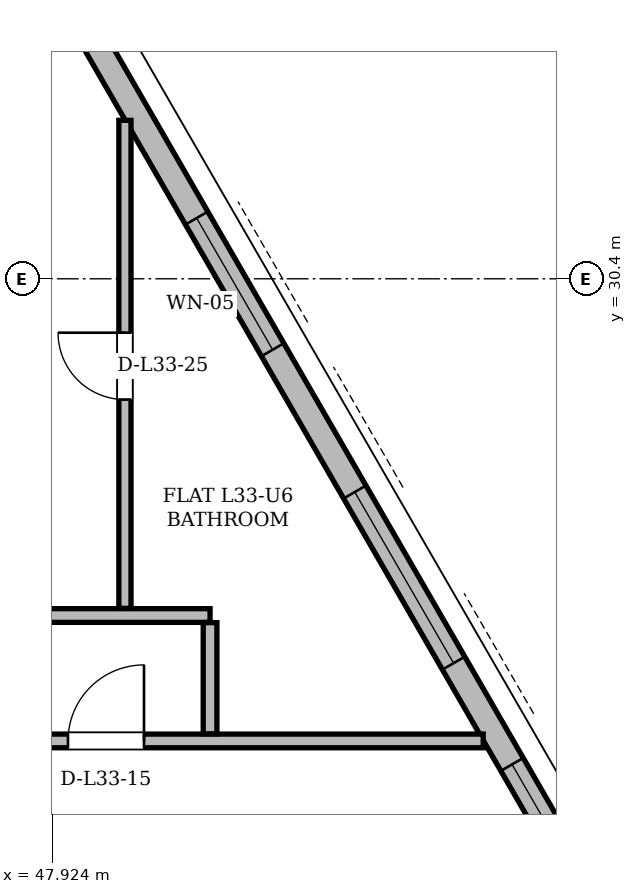
"""IFC4 building model, lengths in metres.
Left out: names, types, materials, properties, quantities, classifications, styles, units other than length and angle.
Written with IfcOpenShell. Run it as: python <this file> out.ifc"""

import sys

from ifc_helpers import new_model, si_unit, direction, frame, frame_2d, origin, place, context, subcontext, project, spatial, rectangle, extrude, element, fill, save


model = new_model("IFC4")
c1 = context("Model", 3, precision=1e-05, world=origin(), true_north=direction((0.0, 1.0)))
c2 = subcontext(c1, "Body", "Model", "MODEL_VIEW")
j1 = project(units=[si_unit("LENGTHUNIT", "METRE"), si_unit("PLANEANGLEUNIT", "RADIAN")], contexts=[c1])
p1 = place(None, origin())
s1 = spatial("IfcSite", under=j1, at=p1, CompositionType="ELEMENT")
p2 = place(p1, origin())
s2 = spatial("IfcBuilding", under=s1, at=p2, CompositionType="ELEMENT")
p3 = place(p2, frame((0.0, 0.0, 126.6)))
s3 = spatial("IfcBuildingStorey", under=s2, at=p3, CompositionType="ELEMENT", Elevation=126.6)
p4 = place(p3, frame((60.311, 13.034, 0.0), z_axis=(0.0, 0.0, 1.0), x_axis=(-0.499998814518, 0.866026088222, 0.0)))
e1 = element("IfcWall", 1, at=p4, inside=s3, PredefinedType="SOLIDWALL", context=c2, shape_type="SweptSolid", body=[
    extrude(rectangle(XDim=35.049, YDim=0.34, at=frame_2d((17.524, 0.0))), origin(), (0.0, 0.0, 1.0), 2.578),
])
p5 = place(p4, frame((8.034, 0.0, 0.0)))
e2 = element("IfcOpeningElement", 2, at=p5, cuts=e1, PredefinedType="OPENING", context=c2, shape_type="SweptSolid", body=[
    extrude(rectangle(XDim=1.5, YDim=2.2, at=frame_2d((0.75, 1.1))), frame((0.0, 0.17, 0.0), z_axis=(0.0, -1.0, 0.0), x_axis=(1.0, 0.0, 0.0)), (0.0, 0.0, 1.0), 0.34),
])
p6 = place(p4, frame((26.969, 0.0, 0.0)))
e3 = element("IfcOpeningElement", 3, at=p6, cuts=e1, PredefinedType="OPENING", context=c2, shape_type="SweptSolid", body=[
    extrude(rectangle(XDim=1.5, YDim=2.2, at=frame_2d((0.75, 1.1))), frame((0.0, 0.17, 0.0), z_axis=(0.0, -1.0, 0.0), x_axis=(1.0, 0.0, 0.0)), (0.0, 0.0, 1.0), 0.34),
])
p7 = place(p4, frame((3.306, 0.0, 0.85)))
e4 = element("IfcOpeningElement", 4, at=p7, cuts=e1, PredefinedType="OPENING", context=c2, shape_type="SweptSolid", body=[
    extrude(rectangle(XDim=1.2, YDim=1.48, at=frame_2d((0.6, 0.74))), frame((0.0, 0.17, 0.0), z_axis=(0.0, -1.0, 0.0), x_axis=(1.0, 0.0, 0.0)), (0.0, 0.0, 1.0), 0.34),
])
p8 = place(p4, frame((11.475, 0.0, 0.85)))
e5 = element("IfcOpeningElement", 5, at=p8, cuts=e1, PredefinedType="OPENING", context=c2, shape_type="SweptSolid", body=[
    extrude(rectangle(XDim=1.2, YDim=1.48, at=frame_2d((0.6, 0.74))), frame((0.0, 0.17, 0.0), z_axis=(0.0, -1.0, 0.0), x_axis=(1.0, 0.0, 0.0)), (0.0, 0.0, 1.0), 0.34),
])
p9 = place(p4, frame((31.134, 0.0, 0.85)))
e6 = element("IfcOpeningElement", 6, at=p9, cuts=e1, PredefinedType="OPENING", context=c2, shape_type="SweptSolid", body=[
    extrude(rectangle(XDim=2.2, YDim=1.618, at=frame_2d((1.1, 0.809))), frame((0.0, 0.17, 0.0), z_axis=(0.0, -1.0, 0.0), x_axis=(1.0, 0.0, 0.0)), (0.0, 0.0, 1.0), 0.34),
])
p10 = place(p4, frame((14.213, 0.0, 0.85)))
e7 = element("IfcOpeningElement", 7, at=p10, cuts=e1, PredefinedType="OPENING", context=c2, shape_type="SweptSolid", body=[
    extrude(rectangle(XDim=2.6, YDim=1.618, at=frame_2d((1.3, 0.809))), frame((0.0, 0.17, 0.0), z_axis=(0.0, -1.0, 0.0), x_axis=(1.0, 0.0, 0.0)), (0.0, 0.0, 1.0), 0.34),
])
p11 = place(p4, frame((18.975, 0.0, 0.85)))
e8 = element("IfcOpeningElement", 8, at=p11, cuts=e1, PredefinedType="OPENING", context=c2, shape_type="SweptSolid", body=[
    extrude(rectangle(XDim=2.0, YDim=1.618, at=frame_2d((1.0, 0.809))), frame((0.0, 0.17, 0.0), z_axis=(0.0, -1.0, 0.0), x_axis=(1.0, 0.0, 0.0)), (0.0, 0.0, 1.0), 0.34),
])
p12 = place(p3, frame((46.09, 24.32, 0.0), z_axis=(0.0, 0.0, 1.0), x_axis=(1.0, 0.0, 0.0)))
e9 = element("IfcWall", 9, at=p12, inside=s3, PredefinedType="PARTITIONING", context=c2, shape_type="SweptSolid", body=[
    extrude(rectangle(XDim=7.504, YDim=0.18, at=frame_2d((3.752, 0.0))), origin(), (0.0, 0.0, 1.0), 3.36),
])
p13 = place(p12, frame((2.041, 0.0, 0.0)))
e10 = element("IfcOpeningElement", 10, at=p13, cuts=e9, PredefinedType="OPENING", context=c2, shape_type="SweptSolid", body=[
    extrude(rectangle(XDim=1.0, YDim=2.18, at=frame_2d((0.5, 1.09))), frame((0.0, 0.09, 0.0), z_axis=(0.0, -1.0, 0.0), x_axis=(1.0, 0.0, 0.0)), (0.0, 0.0, 1.0), 0.18),
])
p14 = place(p3, frame((38.3, 25.97, 0.0), z_axis=(0.0, 0.0, 1.0), x_axis=(1.0, 0.0, 0.0)))
e11 = element("IfcWall", 11, at=p14, inside=s3, PredefinedType="PARTITIONING", context=c2, shape_type="SweptSolid", body=[
    extrude(rectangle(XDim=11.7, YDim=0.18, at=frame_2d((5.85, 0.0))), origin(), (0.0, 0.0, 1.0), 2.814),
])
p15 = place(p3, frame((48.88, 26.064, 0.0), z_axis=(0.0, 0.0, 1.0), x_axis=(0.0, 1.0, 0.0)))
e12 = element("IfcWall", 12, at=p15, inside=s3, PredefinedType="PARTITIONING", context=c2, shape_type="SweptSolid", body=[
    extrude(rectangle(XDim=6.421, YDim=0.16, at=frame_2d((3.21, 0.0))), origin(), (0.0, 0.0, 1.0), 2.578),
])
p16 = place(p15, frame((2.747, 0.0, 0.0)))
e13 = element("IfcOpeningElement", 13, at=p16, cuts=e12, PredefinedType="OPENING", context=c2, shape_type="SweptSolid", body=[
    extrude(rectangle(XDim=0.88, YDim=2.08, at=frame_2d((0.44, 1.04))), frame((0.0, 0.08, 0.0), z_axis=(0.0, -1.0, 0.0), x_axis=(1.0, 0.0, 0.0)), (0.0, 0.0, 1.0), 0.16),
])
p17 = place(p3, frame((50.0, 24.414, 0.0), z_axis=(0.0, 0.0, 1.0), x_axis=(0.0, 1.0, 0.0)))
e14 = element("IfcWall", 14, at=p17, inside=s3, PredefinedType="PARTITIONING", context=c2, shape_type="SweptSolid", body=[
    extrude(rectangle(XDim=1.462, YDim=0.18, at=frame_2d((0.731, 0.0))), origin(), (0.0, 0.0, 1.0), 3.36),
])
p18 = place(p8, origin())
e15 = element("IfcWindow", 15, at=p18, inside=s3, PartitioningType="SINGLE_PANEL", PredefinedType="WINDOW", context=c2, shape_type="SweptSolid", body=[
    extrude(rectangle(XDim=1.2, YDim=1.48, at=frame_2d((0.6, 0.74))), frame((0.0, 0.03, 0.0), z_axis=(0.0, -1.0, 0.0), x_axis=(1.0, 0.0, 0.0)), (0.0, 0.0, 1.0), 0.06),
])
fill(e5, e15)
p19 = place(p10, origin())
e16 = element("IfcWindow", 16, at=p19, inside=s3, PartitioningType="SINGLE_PANEL", PredefinedType="WINDOW", context=c2, shape_type="SweptSolid", body=[
    extrude(rectangle(XDim=2.6, YDim=1.618, at=frame_2d((1.3, 0.809))), frame((0.0, 0.03, 0.0), z_axis=(0.0, -1.0, 0.0), x_axis=(1.0, 0.0, 0.0)), (0.0, 0.0, 1.0), 0.06),
])
fill(e7, e16)
p20 = place(p11, origin())
e17 = element("IfcWindow", 17, at=p20, inside=s3, PartitioningType="SINGLE_PANEL", PredefinedType="WINDOW", context=c2, shape_type="SweptSolid", body=[
    extrude(rectangle(XDim=2.0, YDim=1.618, at=frame_2d((1.0, 0.809))), frame((0.0, 0.03, 0.0), z_axis=(0.0, -1.0, 0.0), x_axis=(1.0, 0.0, 0.0)), (0.0, 0.0, 1.0), 0.06),
])
fill(e8, e17)
p21 = place(p13, origin())
e18 = element("IfcDoor", 18, at=p21, inside=s3, OperationType="SINGLE_SWING_RIGHT", PredefinedType="DOOR", context=c2, shape_type="SweptSolid", body=[
    extrude(rectangle(XDim=1.0, YDim=2.18, at=frame_2d((0.5, 1.09))), frame((0.0, 0.025, 0.0), z_axis=(0.0, -1.0, 0.0), x_axis=(1.0, 0.0, 0.0)), (0.0, 0.0, 1.0), 0.05),
])
fill(e10, e18)
p22 = place(p16, origin())
e19 = element("IfcDoor", 19, at=p22, inside=s3, OperationType="SINGLE_SWING_RIGHT", PredefinedType="DOOR", context=c2, shape_type="SweptSolid", body=[
    extrude(rectangle(XDim=0.88, YDim=2.08, at=frame_2d((0.44, 1.04))), frame((0.0, 0.025, 0.0), z_axis=(0.0, -1.0, 0.0), x_axis=(1.0, 0.0, 0.0)), (0.0, 0.0, 1.0), 0.05),
])
fill(e13, e19)
save(model, sys.argv[1])
